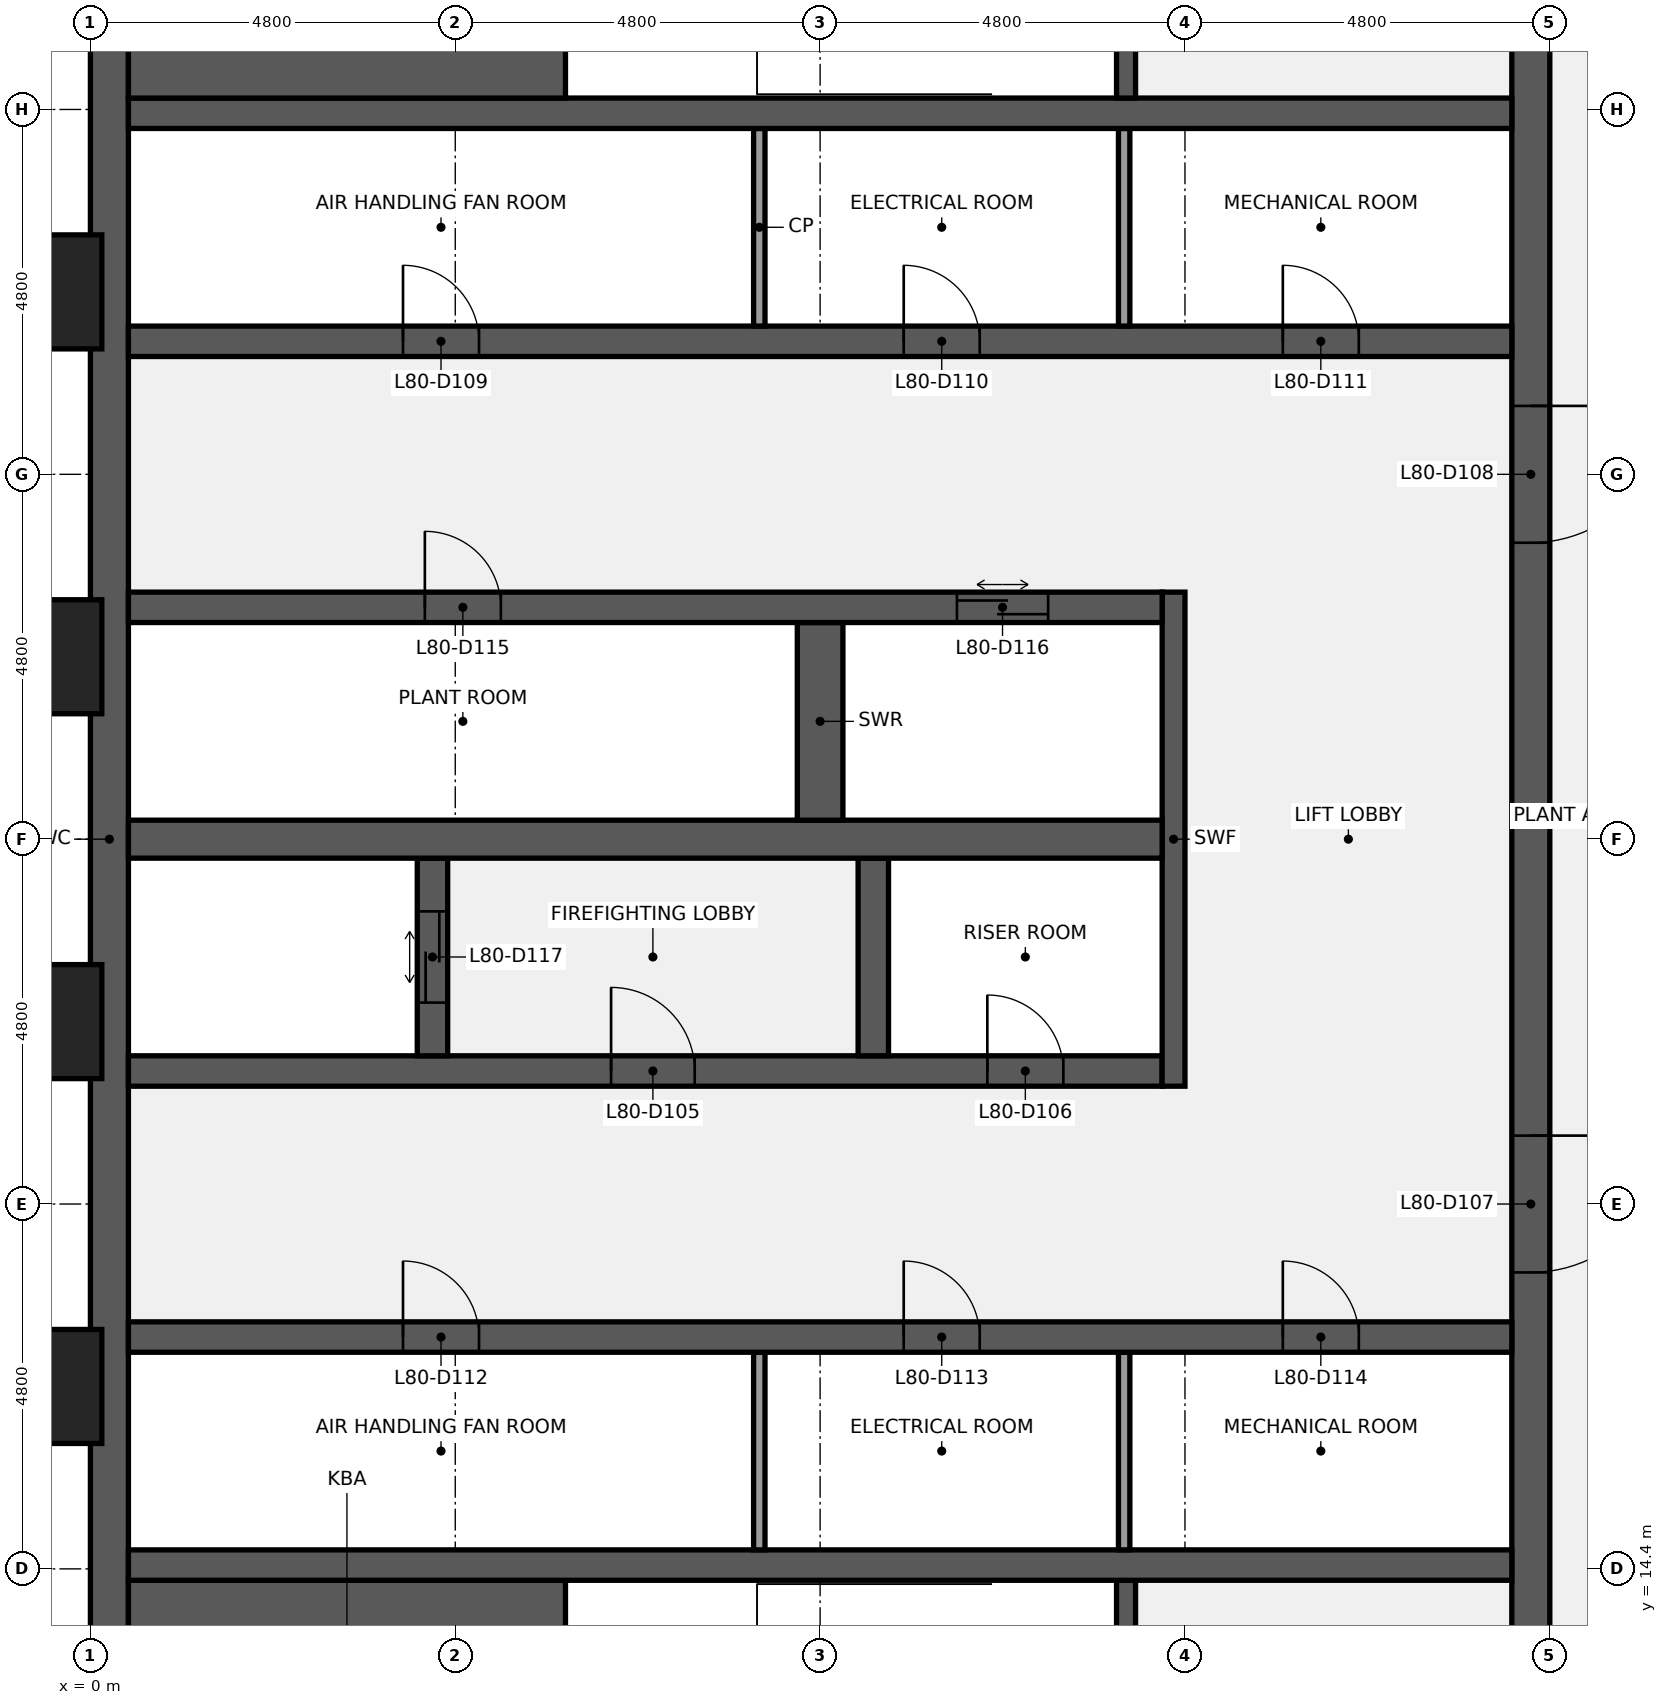
"""IFC4 building model, lengths in metres.
Left out: names, types, materials, properties, quantities, classifications, styles, units other than length and angle.
Written with IfcOpenShell. Run it as: python <this file> out.ifc"""

import sys

from ifc_helpers import new_model, si_unit, direction, frame, frame_2d, origin, origin_2d, place, context, subcontext, project, spatial, rectangle, extrude, element, fill, save


model = new_model("IFC4")
c1 = context("Model", 3, precision=1e-05, world=origin(), true_north=direction((0.0, 1.0)))
c2 = subcontext(c1, "Body", "Model", "MODEL_VIEW")
j1 = project(units=[si_unit("LENGTHUNIT", "METRE"), si_unit("PLANEANGLEUNIT", "RADIAN")], contexts=[c1])
p1 = place(None, origin())
s1 = spatial("IfcSite", under=j1, at=p1, CompositionType="ELEMENT")
p2 = place(p1, origin())
s2 = spatial("IfcBuilding", under=s1, at=p2, CompositionType="ELEMENT")
p3 = place(p2, frame((0.0, 0.0, 358.3)))
s3 = spatial("IfcBuildingStorey", under=s2, at=p3, CompositionType="ELEMENT", Elevation=358.3)
p4 = place(p3, frame((0.25, 9.6, 0.0), z_axis=(0.0, 0.0, 1.0), x_axis=(0.0, 1.0, 0.0)))
e1 = element("IfcWall", 1, at=p4, inside=s3, PredefinedType="SHEAR", context=c2, shape_type="SweptSolid", body=[
    extrude(rectangle(XDim=28.8, YDim=0.5, at=frame_2d((14.4, 0.0))), origin(), (0.0, 0.0, 1.0), 3.75),
])
p5 = place(p3, frame((18.95, 38.4, 0.0), z_axis=(0.0, 0.0, 1.0), x_axis=(0.0, -1.0, 0.0)))
e2 = element("IfcWall", 2, at=p5, inside=s3, PredefinedType="SHEAR", context=c2, shape_type="SweptSolid", body=[
    extrude(rectangle(XDim=28.8, YDim=0.5, at=frame_2d((14.4, 0.0))), origin(), (0.0, 0.0, 1.0), 3.75),
])
p6 = place(p5, frame((18.3, 0.0, 0.0)))
e3 = element("IfcOpeningElement", 3, at=p6, cuts=e2, PredefinedType="OPENING", context=c2, shape_type="SweptSolid", body=[
    extrude(rectangle(XDim=1.8, YDim=2.1, at=frame_2d((0.9, 1.05))), frame((0.0, 0.26, 0.0), z_axis=(0.0, -1.0, 0.0), x_axis=(1.0, 0.0, 0.0)), (0.0, 0.0, 1.0), 0.52),
])
p7 = place(p5, frame((8.7, 0.0, 0.0)))
e4 = element("IfcOpeningElement", 4, at=p7, cuts=e2, PredefinedType="OPENING", context=c2, shape_type="SweptSolid", body=[
    extrude(rectangle(XDim=1.8, YDim=2.1, at=frame_2d((0.9, 1.05))), frame((0.0, 0.26, 0.0), z_axis=(0.0, -1.0, 0.0), x_axis=(1.0, 0.0, 0.0)), (0.0, 0.0, 1.0), 0.52),
])
p8 = place(p3, frame((0.5, 12.175, 0.0), z_axis=(0.0, 0.0, 1.0), x_axis=(1.0, 0.0, 0.0)))
e5 = element("IfcWall", 5, at=p8, inside=s3, PredefinedType="SHEAR", context=c2, shape_type="SweptSolid", body=[
    extrude(rectangle(XDim=5.75, YDim=4.15, at=frame_2d((2.875, 0.0))), origin(), (0.0, 0.0, 1.0), 3.75),
])
p9 = place(p3, frame((13.625, 10.8, 0.0), z_axis=(0.0, 0.0, 1.0), x_axis=(0.0, 1.0, 0.0)))
e6 = element("IfcWall", 6, at=p9, inside=s3, PredefinedType="SHEAR", context=c2, shape_type="SweptSolid", body=[
    extrude(rectangle(XDim=3.45, YDim=0.25, at=frame_2d((1.725, 0.0))), origin(), (0.0, 0.0, 1.0), 3.75),
])
p10 = place(p9, frame((1.175, 0.0, 0.0)))
e7 = element("IfcOpeningElement", 7, at=p10, cuts=e6, PredefinedType="OPENING", context=c2, shape_type="SweptSolid", body=[
    extrude(rectangle(XDim=1.1, YDim=2.1, at=frame_2d((0.55, 1.05))), frame((0.0, 0.135, 0.0), z_axis=(0.0, -1.0, 0.0), x_axis=(1.0, 0.0, 0.0)), (0.0, 0.0, 1.0), 0.27),
])
p11 = place(p3, frame((0.5, 14.45, 0.0), z_axis=(0.0, 0.0, 1.0), x_axis=(1.0, 0.0, 0.0)))
e8 = element("IfcWall", 8, at=p11, inside=s3, PredefinedType="SHEAR", context=c2, shape_type="SweptSolid", body=[
    extrude(rectangle(XDim=18.2, YDim=0.4, at=frame_2d((9.1, 0.0))), origin(), (0.0, 0.0, 1.0), 3.75),
])
for number, where, z_axis, x_axis in (
    (9, (8.8, 14.65, 0.0), (0.0, 0.0, 1.0), (0.0, 1.0, 0.0)),
    (10, (13.6, 14.65, 0.0), (0.0, 0.0, 1.0), (0.0, 1.0, 0.0)),
):
    element("IfcWall", number, at=place(p3, frame(where, z_axis=z_axis, x_axis=x_axis)), inside=s3, PredefinedType="PARTITIONING", context=c2, shape_type="SweptSolid", body=[
        extrude(rectangle(XDim=2.6, YDim=0.15, at=frame_2d((1.3, 0.0))), origin(), (0.0, 0.0, 1.0), 3.75),
    ])
p12 = place(p3, frame((0.5, 17.45, 0.0), z_axis=(0.0, 0.0, 1.0), x_axis=(1.0, 0.0, 0.0)))
e11 = element("IfcWall", 11, at=p12, inside=s3, PredefinedType="SHEAR", context=c2, shape_type="SweptSolid", body=[
    extrude(rectangle(XDim=18.2, YDim=0.4, at=frame_2d((9.1, 0.0))), origin(), (0.0, 0.0, 1.0), 3.75),
])
p13 = place(p12, frame((3.613, 0.0, 0.0)))
e12 = element("IfcOpeningElement", 12, at=p13, cuts=e11, PredefinedType="OPENING", context=c2, shape_type="SweptSolid", body=[
    extrude(rectangle(XDim=1.0, YDim=2.1, at=frame_2d((0.5, 1.05))), frame((0.0, 0.21, 0.0), z_axis=(0.0, -1.0, 0.0), x_axis=(1.0, 0.0, 0.0)), (0.0, 0.0, 1.0), 0.42),
])
p14 = place(p12, frame((10.2, 0.0, 0.0)))
e13 = element("IfcOpeningElement", 13, at=p14, cuts=e11, PredefinedType="OPENING", context=c2, shape_type="SweptSolid", body=[
    extrude(rectangle(XDim=1.0, YDim=2.1, at=frame_2d((0.5, 1.05))), frame((0.0, 0.21, 0.0), z_axis=(0.0, -1.0, 0.0), x_axis=(1.0, 0.0, 0.0)), (0.0, 0.0, 1.0), 0.42),
])
p15 = place(p12, frame((15.188, 0.0, 0.0)))
e14 = element("IfcOpeningElement", 14, at=p15, cuts=e11, PredefinedType="OPENING", context=c2, shape_type="SweptSolid", body=[
    extrude(rectangle(XDim=1.0, YDim=2.1, at=frame_2d((0.5, 1.05))), frame((0.0, 0.21, 0.0), z_axis=(0.0, -1.0, 0.0), x_axis=(1.0, 0.0, 0.0)), (0.0, 0.0, 1.0), 0.42),
])
p16 = place(p3, frame((0.5, 20.95, 0.0), z_axis=(0.0, 0.0, 1.0), x_axis=(1.0, 0.0, 0.0)))
e15 = element("IfcWall", 15, at=p16, inside=s3, PredefinedType="SHEAR", context=c2, shape_type="SweptSolid", body=[
    extrude(rectangle(XDim=13.6, YDim=0.4, at=frame_2d((6.8, 0.0))), origin(), (0.0, 0.0, 1.0), 3.75),
])
p17 = place(p16, frame((6.35, 0.0, 0.0)))
e16 = element("IfcOpeningElement", 16, at=p17, cuts=e15, PredefinedType="OPENING", context=c2, shape_type="SweptSolid", body=[
    extrude(rectangle(XDim=1.1, YDim=2.1, at=frame_2d((0.55, 1.05))), frame((0.0, 0.21, 0.0), z_axis=(0.0, -1.0, 0.0), x_axis=(1.0, 0.0, 0.0)), (0.0, 0.0, 1.0), 0.42),
])
p18 = place(p16, frame((11.3, 0.0, 0.0)))
e17 = element("IfcOpeningElement", 17, at=p18, cuts=e15, PredefinedType="OPENING", context=c2, shape_type="SweptSolid", body=[
    extrude(rectangle(XDim=1.0, YDim=2.1, at=frame_2d((0.5, 1.05))), frame((0.0, 0.21, 0.0), z_axis=(0.0, -1.0, 0.0), x_axis=(1.0, 0.0, 0.0)), (0.0, 0.0, 1.0), 0.42),
])
p19 = place(p3, frame((14.25, 20.75, 0.0), z_axis=(0.0, 0.0, 1.0), x_axis=(0.0, 1.0, 0.0)))
e18 = element("IfcWall", 18, at=p19, inside=s3, PredefinedType="SHEAR", context=c2, shape_type="SweptSolid", body=[
    extrude(rectangle(XDim=6.5, YDim=0.3, at=frame_2d((3.25, 0.0))), origin(), (0.0, 0.0, 1.0), 3.75),
])
p20 = place(p3, frame((4.5, 21.15, 0.0), z_axis=(0.0, 0.0, 1.0), x_axis=(0.0, 1.0, 0.0)))
e19 = element("IfcWall", 19, at=p20, inside=s3, PredefinedType="SHEAR", context=c2, shape_type="SweptSolid", body=[
    extrude(rectangle(XDim=2.6, YDim=0.4, at=frame_2d((1.3, 0.0))), origin(), (0.0, 0.0, 1.0), 3.75),
])
p21 = place(p20, frame((0.7, 0.0, 0.0)))
e20 = element("IfcOpeningElement", 20, at=p21, cuts=e19, PredefinedType="OPENING", context=c2, shape_type="SweptSolid", body=[
    extrude(rectangle(XDim=1.2, YDim=2.1, at=frame_2d((0.6, 1.05))), frame((0.0, 0.21, 0.0), z_axis=(0.0, -1.0, 0.0), x_axis=(1.0, 0.0, 0.0)), (0.0, 0.0, 1.0), 0.42),
])
p22 = place(p3, frame((10.3, 21.15, 0.0), z_axis=(0.0, 0.0, 1.0), x_axis=(0.0, 1.0, 0.0)))
e21 = element("IfcWall", 21, at=p22, inside=s3, PredefinedType="SHEAR", context=c2, shape_type="SweptSolid", body=[
    extrude(rectangle(XDim=2.6, YDim=0.4, at=frame_2d((1.3, 0.0))), origin(), (0.0, 0.0, 1.0), 3.75),
])
p23 = place(p3, frame((0.5, 24.0, 0.0), z_axis=(0.0, 0.0, 1.0), x_axis=(1.0, 0.0, 0.0)))
e22 = element("IfcWall", 22, at=p23, inside=s3, PredefinedType="SHEAR", context=c2, shape_type="SweptSolid", body=[
    extrude(rectangle(XDim=13.6, YDim=0.5, at=frame_2d((6.8, 0.0))), origin(), (0.0, 0.0, 1.0), 3.75),
])
p24 = place(p3, frame((9.6, 24.25, 0.0), z_axis=(0.0, 0.0, 1.0), x_axis=(0.0, 1.0, 0.0)))
e23 = element("IfcWall", 23, at=p24, inside=s3, PredefinedType="SHEAR", context=c2, shape_type="SweptSolid", body=[
    extrude(rectangle(XDim=2.6, YDim=0.6, at=frame_2d((1.3, 0.0))), origin(), (0.0, 0.0, 1.0), 3.75),
])
p25 = place(p3, frame((0.5, 27.05, 0.0), z_axis=(0.0, 0.0, 1.0), x_axis=(1.0, 0.0, 0.0)))
e24 = element("IfcWall", 24, at=p25, inside=s3, PredefinedType="SHEAR", context=c2, shape_type="SweptSolid", body=[
    extrude(rectangle(XDim=13.6, YDim=0.4, at=frame_2d((6.8, 0.0))), origin(), (0.0, 0.0, 1.0), 3.75),
])
p26 = place(p25, frame((3.9, 0.0, 0.0)))
e25 = element("IfcOpeningElement", 25, at=p26, cuts=e24, PredefinedType="OPENING", context=c2, shape_type="SweptSolid", body=[
    extrude(rectangle(XDim=1.0, YDim=2.1, at=frame_2d((0.5, 1.05))), frame((0.0, 0.21, 0.0), z_axis=(0.0, -1.0, 0.0), x_axis=(1.0, 0.0, 0.0)), (0.0, 0.0, 1.0), 0.42),
])
p27 = place(p25, frame((10.9, 0.0, 0.0)))
e26 = element("IfcOpeningElement", 26, at=p27, cuts=e24, PredefinedType="OPENING", context=c2, shape_type="SweptSolid", body=[
    extrude(rectangle(XDim=1.2, YDim=2.1, at=frame_2d((0.6, 1.05))), frame((0.0, 0.21, 0.0), z_axis=(0.0, -1.0, 0.0), x_axis=(1.0, 0.0, 0.0)), (0.0, 0.0, 1.0), 0.42),
])
p28 = place(p3, frame((0.5, 30.55, 0.0), z_axis=(0.0, 0.0, 1.0), x_axis=(1.0, 0.0, 0.0)))
e27 = element("IfcWall", 27, at=p28, inside=s3, PredefinedType="SHEAR", context=c2, shape_type="SweptSolid", body=[
    extrude(rectangle(XDim=18.2, YDim=0.4, at=frame_2d((9.1, 0.0))), origin(), (0.0, 0.0, 1.0), 3.75),
])
p29 = place(p28, frame((3.613, 0.0, 0.0)))
e28 = element("IfcOpeningElement", 28, at=p29, cuts=e27, PredefinedType="OPENING", context=c2, shape_type="SweptSolid", body=[
    extrude(rectangle(XDim=1.0, YDim=2.1, at=frame_2d((0.5, 1.05))), frame((0.0, 0.21, 0.0), z_axis=(0.0, -1.0, 0.0), x_axis=(1.0, 0.0, 0.0)), (0.0, 0.0, 1.0), 0.42),
])
p30 = place(p28, frame((10.2, 0.0, 0.0)))
e29 = element("IfcOpeningElement", 29, at=p30, cuts=e27, PredefinedType="OPENING", context=c2, shape_type="SweptSolid", body=[
    extrude(rectangle(XDim=1.0, YDim=2.1, at=frame_2d((0.5, 1.05))), frame((0.0, 0.21, 0.0), z_axis=(0.0, -1.0, 0.0), x_axis=(1.0, 0.0, 0.0)), (0.0, 0.0, 1.0), 0.42),
])
p31 = place(p28, frame((15.188, 0.0, 0.0)))
e30 = element("IfcOpeningElement", 30, at=p31, cuts=e27, PredefinedType="OPENING", context=c2, shape_type="SweptSolid", body=[
    extrude(rectangle(XDim=1.0, YDim=2.1, at=frame_2d((0.5, 1.05))), frame((0.0, 0.21, 0.0), z_axis=(0.0, -1.0, 0.0), x_axis=(1.0, 0.0, 0.0)), (0.0, 0.0, 1.0), 0.42),
])
for number, where, z_axis, x_axis in (
    (31, (8.8, 30.75, 0.0), (0.0, 0.0, 1.0), (0.0, 1.0, 0.0)),
    (32, (13.6, 30.75, 0.0), (0.0, 0.0, 1.0), (0.0, 1.0, 0.0)),
):
    element("IfcWall", number, at=place(p3, frame(where, z_axis=z_axis, x_axis=x_axis)), inside=s3, PredefinedType="PARTITIONING", context=c2, shape_type="SweptSolid", body=[
        extrude(rectangle(XDim=2.6, YDim=0.15, at=frame_2d((1.3, 0.0))), origin(), (0.0, 0.0, 1.0), 3.75),
    ])
p32 = place(p3, frame((0.5, 33.55, 0.0), z_axis=(0.0, 0.0, 1.0), x_axis=(1.0, 0.0, 0.0)))
e33 = element("IfcWall", 33, at=p32, inside=s3, PredefinedType="SHEAR", context=c2, shape_type="SweptSolid", body=[
    extrude(rectangle(XDim=18.2, YDim=0.4, at=frame_2d((9.1, 0.0))), origin(), (0.0, 0.0, 1.0), 3.75),
])
p33 = place(p3, frame((0.5, 35.825, 0.0), z_axis=(0.0, 0.0, 1.0), x_axis=(1.0, 0.0, 0.0)))
e34 = element("IfcWall", 34, at=p33, inside=s3, PredefinedType="SHEAR", context=c2, shape_type="SweptSolid", body=[
    extrude(rectangle(XDim=5.75, YDim=4.15, at=frame_2d((2.875, 0.0))), origin(), (0.0, 0.0, 1.0), 3.75),
])
p34 = place(p3, frame((13.625, 33.75, 0.0), z_axis=(0.0, 0.0, 1.0), x_axis=(0.0, 1.0, 0.0)))
e35 = element("IfcWall", 35, at=p34, inside=s3, PredefinedType="SHEAR", context=c2, shape_type="SweptSolid", body=[
    extrude(rectangle(XDim=3.45, YDim=0.25, at=frame_2d((1.725, 0.0))), origin(), (0.0, 0.0, 1.0), 3.75),
])
p35 = place(p34, frame((1.175, 0.0, 0.0)))
e36 = element("IfcOpeningElement", 36, at=p35, cuts=e35, PredefinedType="OPENING", context=c2, shape_type="SweptSolid", body=[
    extrude(rectangle(XDim=1.1, YDim=2.1, at=frame_2d((0.55, 1.05))), frame((0.0, 0.135, 0.0), z_axis=(0.0, -1.0, 0.0), x_axis=(1.0, 0.0, 0.0)), (0.0, 0.0, 1.0), 0.27),
])
for number, where, z_axis, x_axis in (
    (37, (-0.75, 16.8, 0.0), (0.0, 0.0, 1.0), (0.0, 1.0, 0.0)),
    (38, (-0.75, 21.6, 0.0), (0.0, 0.0, 1.0), (0.0, 1.0, 0.0)),
    (39, (-0.75, 26.4, 0.0), (0.0, 0.0, 1.0), (0.0, 1.0, 0.0)),
    (40, (-0.75, 31.2, 0.0), (0.0, 0.0, 1.0), (0.0, 1.0, 0.0)),
):
    element("IfcColumn", number, at=place(p3, frame(where, z_axis=z_axis, x_axis=x_axis)), inside=s3, PredefinedType="PILASTER", context=c2, shape_type="SweptSolid", body=[
        extrude(rectangle(XDim=1.8, YDim=1.5, at=origin_2d()), origin(), (0.0, 0.0, 1.0), 4.0),
    ])
p36 = place(p17, origin())
e41 = element("IfcDoor", 41, at=p36, inside=s3, OperationType="SINGLE_SWING_LEFT", PredefinedType="DOOR", context=c2, shape_type="SweptSolid", body=[
    extrude(rectangle(XDim=1.1, YDim=2.1, at=frame_2d((0.55, 1.05))), frame((0.0, 0.025, 0.0), z_axis=(0.0, -1.0, 0.0), x_axis=(1.0, 0.0, 0.0)), (0.0, 0.0, 1.0), 0.05),
])
fill(e16, e41)
p37 = place(p18, origin())
e42 = element("IfcDoor", 42, at=p37, inside=s3, OperationType="SINGLE_SWING_LEFT", PredefinedType="DOOR", context=c2, shape_type="SweptSolid", body=[
    extrude(rectangle(XDim=1.0, YDim=2.1, at=frame_2d((0.5, 1.05))), frame((0.0, 0.025, 0.0), z_axis=(0.0, -1.0, 0.0), x_axis=(1.0, 0.0, 0.0)), (0.0, 0.0, 1.0), 0.05),
])
fill(e17, e42)
p38 = place(p6, origin())
e43 = element("IfcDoor", 43, at=p38, inside=s3, OperationType="DOUBLE_DOOR_SINGLE_SWING", PredefinedType="DOOR", context=c2, shape_type="SweptSolid", body=[
    extrude(rectangle(XDim=1.8, YDim=2.1, at=frame_2d((0.9, 1.05))), frame((0.0, 0.025, 0.0), z_axis=(0.0, -1.0, 0.0), x_axis=(1.0, 0.0, 0.0)), (0.0, 0.0, 1.0), 0.05),
])
fill(e3, e43)
p39 = place(p7, origin())
e44 = element("IfcDoor", 44, at=p39, inside=s3, OperationType="DOUBLE_DOOR_SINGLE_SWING", PredefinedType="DOOR", context=c2, shape_type="SweptSolid", body=[
    extrude(rectangle(XDim=1.8, YDim=2.1, at=frame_2d((0.9, 1.05))), frame((0.0, 0.025, 0.0), z_axis=(0.0, -1.0, 0.0), x_axis=(1.0, 0.0, 0.0)), (0.0, 0.0, 1.0), 0.05),
])
fill(e4, e44)
p40 = place(p29, origin())
e45 = element("IfcDoor", 45, at=p40, inside=s3, OperationType="SINGLE_SWING_LEFT", PredefinedType="DOOR", context=c2, shape_type="SweptSolid", body=[
    extrude(rectangle(XDim=1.0, YDim=2.1, at=frame_2d((0.5, 1.05))), frame((0.0, 0.025, 0.0), z_axis=(0.0, -1.0, 0.0), x_axis=(1.0, 0.0, 0.0)), (0.0, 0.0, 1.0), 0.05),
])
fill(e28, e45)
p41 = place(p30, origin())
e46 = element("IfcDoor", 46, at=p41, inside=s3, OperationType="SINGLE_SWING_LEFT", PredefinedType="DOOR", context=c2, shape_type="SweptSolid", body=[
    extrude(rectangle(XDim=1.0, YDim=2.1, at=frame_2d((0.5, 1.05))), frame((0.0, 0.025, 0.0), z_axis=(0.0, -1.0, 0.0), x_axis=(1.0, 0.0, 0.0)), (0.0, 0.0, 1.0), 0.05),
])
fill(e29, e46)
p42 = place(p31, origin())
e47 = element("IfcDoor", 47, at=p42, inside=s3, OperationType="SINGLE_SWING_LEFT", PredefinedType="DOOR", context=c2, shape_type="SweptSolid", body=[
    extrude(rectangle(XDim=1.0, YDim=2.1, at=frame_2d((0.5, 1.05))), frame((0.0, 0.025, 0.0), z_axis=(0.0, -1.0, 0.0), x_axis=(1.0, 0.0, 0.0)), (0.0, 0.0, 1.0), 0.05),
])
fill(e30, e47)
p43 = place(p13, origin())
e48 = element("IfcDoor", 48, at=p43, inside=s3, OperationType="SINGLE_SWING_LEFT", PredefinedType="DOOR", context=c2, shape_type="SweptSolid", body=[
    extrude(rectangle(XDim=1.0, YDim=2.1, at=frame_2d((0.5, 1.05))), frame((0.0, 0.025, 0.0), z_axis=(0.0, -1.0, 0.0), x_axis=(1.0, 0.0, 0.0)), (0.0, 0.0, 1.0), 0.05),
])
fill(e12, e48)
p44 = place(p14, origin())
e49 = element("IfcDoor", 49, at=p44, inside=s3, OperationType="SINGLE_SWING_LEFT", PredefinedType="DOOR", context=c2, shape_type="SweptSolid", body=[
    extrude(rectangle(XDim=1.0, YDim=2.1, at=frame_2d((0.5, 1.05))), frame((0.0, 0.025, 0.0), z_axis=(0.0, -1.0, 0.0), x_axis=(1.0, 0.0, 0.0)), (0.0, 0.0, 1.0), 0.05),
])
fill(e13, e49)
p45 = place(p15, origin())
e50 = element("IfcDoor", 50, at=p45, inside=s3, OperationType="SINGLE_SWING_LEFT", PredefinedType="DOOR", context=c2, shape_type="SweptSolid", body=[
    extrude(rectangle(XDim=1.0, YDim=2.1, at=frame_2d((0.5, 1.05))), frame((0.0, 0.025, 0.0), z_axis=(0.0, -1.0, 0.0), x_axis=(1.0, 0.0, 0.0)), (0.0, 0.0, 1.0), 0.05),
])
fill(e14, e50)
p46 = place(p26, origin())
e51 = element("IfcDoor", 51, at=p46, inside=s3, OperationType="SINGLE_SWING_LEFT", PredefinedType="DOOR", context=c2, shape_type="SweptSolid", body=[
    extrude(rectangle(XDim=1.0, YDim=2.1, at=frame_2d((0.5, 1.05))), frame((0.0, 0.025, 0.0), z_axis=(0.0, -1.0, 0.0), x_axis=(1.0, 0.0, 0.0)), (0.0, 0.0, 1.0), 0.05),
])
fill(e25, e51)
p47 = place(p27, origin())
e52 = element("IfcDoor", 52, at=p47, inside=s3, OperationType="DOUBLE_DOOR_SLIDING", PredefinedType="DOOR", context=c2, shape_type="SweptSolid", body=[
    extrude(rectangle(XDim=1.2, YDim=2.1, at=frame_2d((0.6, 1.05))), frame((0.0, 0.025, 0.0), z_axis=(0.0, -1.0, 0.0), x_axis=(1.0, 0.0, 0.0)), (0.0, 0.0, 1.0), 0.05),
])
fill(e26, e52)
p48 = place(p21, origin())
e53 = element("IfcDoor", 53, at=p48, inside=s3, OperationType="DOUBLE_DOOR_SLIDING", PredefinedType="DOOR", context=c2, shape_type="SweptSolid", body=[
    extrude(rectangle(XDim=1.2, YDim=2.1, at=frame_2d((0.6, 1.05))), frame((0.0, 0.025, 0.0), z_axis=(0.0, -1.0, 0.0), x_axis=(1.0, 0.0, 0.0)), (0.0, 0.0, 1.0), 0.05),
])
fill(e20, e53)
save(model, sys.argv[1])
